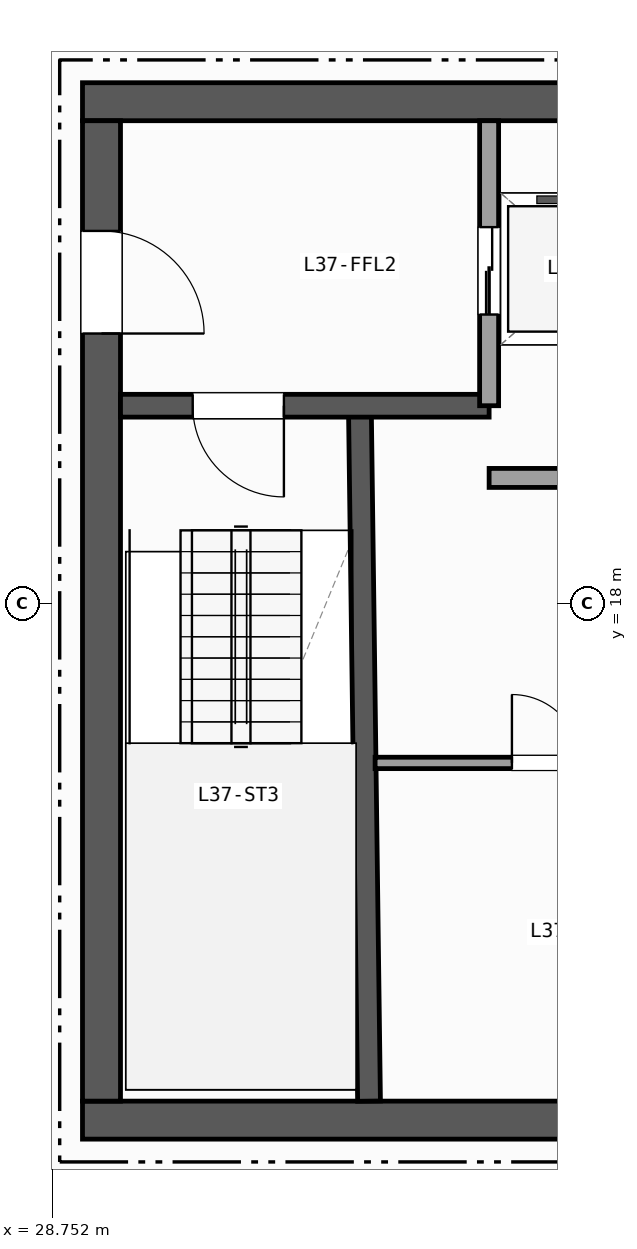
"""IFC4 building model, lengths in metres.
Left out: names, types, materials, properties, quantities, classifications, styles, units other than length and angle.
Written with IfcOpenShell. Run it as: python <this file> out.ifc"""

import sys

from ifc_helpers import new_model, si_unit, direction, frame, frame_2d, origin, place, context, subcontext, project, spatial, rectangle, extrude, element, fill, save


model = new_model("IFC4")
c1 = context("Model", 3, precision=1e-05, world=origin(), true_north=direction((0.0, 1.0)))
c2 = subcontext(c1, "Body", "Model", "MODEL_VIEW")
j1 = project(units=[si_unit("LENGTHUNIT", "METRE"), si_unit("PLANEANGLEUNIT", "RADIAN")], contexts=[c1])
p1 = place(None, origin())
s1 = spatial("IfcSite", under=j1, at=p1, CompositionType="ELEMENT")
p2 = place(p1, origin())
s2 = spatial("IfcBuilding", under=s1, at=p2, CompositionType="ELEMENT")
p3 = place(p2, frame((0.0, 0.0, 150.7)))
s3 = spatial("IfcBuildingStorey", under=s2, at=p3, CompositionType="ELEMENT", Elevation=150.7)
p4 = place(p3, frame((29.15, 11.2, 0.0), z_axis=(0.0, 0.0, 1.0), x_axis=(1.0, 0.0, 0.0)))
e1 = element("IfcWall", 1, at=p4, inside=s3, PredefinedType="SHEAR", context=c2, shape_type="SweptSolid", body=[
    extrude(rectangle(XDim=13.9, YDim=0.5, at=frame_2d((6.95, 0.0))), origin(), (0.0, 0.0, 1.0), 3.42),
])
p5 = place(p3, frame((43.05, 24.6, 0.0), z_axis=(0.0, 0.0, 1.0), x_axis=(-1.0, 0.0, 0.0)))
e2 = element("IfcWall", 2, at=p5, inside=s3, PredefinedType="SHEAR", context=c2, shape_type="SweptSolid", body=[
    extrude(rectangle(XDim=13.9, YDim=0.5, at=frame_2d((6.95, 0.0))), origin(), (0.0, 0.0, 1.0), 3.42),
])
p6 = place(p5, frame((0.75, 0.0, 0.0)))
e3 = element("IfcOpeningElement", 3, at=p6, cuts=e2, PredefinedType="OPENING", context=c2, shape_type="SweptSolid", body=[
    extrude(rectangle(XDim=1.1, YDim=2.15, at=frame_2d((0.55, 1.075))), frame((0.0, 0.26, 0.0), z_axis=(0.0, -1.0, 0.0), x_axis=(1.0, 0.0, 0.0)), (0.0, 0.0, 1.0), 0.52),
])
p7 = place(p5, frame((2.25, 0.0, 0.0)))
e4 = element("IfcOpeningElement", 4, at=p7, cuts=e2, PredefinedType="OPENING", context=c2, shape_type="SweptSolid", body=[
    extrude(rectangle(XDim=0.9, YDim=2.1, at=frame_2d((0.45, 1.05))), frame((0.0, 0.26, 0.0), z_axis=(0.0, -1.0, 0.0), x_axis=(1.0, 0.0, 0.0)), (0.0, 0.0, 1.0), 0.52),
])
p8 = place(p5, frame((3.55, 0.0, 0.0)))
e5 = element("IfcOpeningElement", 5, at=p8, cuts=e2, PredefinedType="OPENING", context=c2, shape_type="SweptSolid", body=[
    extrude(rectangle(XDim=0.9, YDim=2.1, at=frame_2d((0.45, 1.05))), frame((0.0, 0.26, 0.0), z_axis=(0.0, -1.0, 0.0), x_axis=(1.0, 0.0, 0.0)), (0.0, 0.0, 1.0), 0.52),
])
p9 = place(p5, frame((4.9, 0.0, 0.0)))
e6 = element("IfcOpeningElement", 6, at=p9, cuts=e2, PredefinedType="OPENING", context=c2, shape_type="SweptSolid", body=[
    extrude(rectangle(XDim=0.9, YDim=2.1, at=frame_2d((0.45, 1.05))), frame((0.0, 0.26, 0.0), z_axis=(0.0, -1.0, 0.0), x_axis=(1.0, 0.0, 0.0)), (0.0, 0.0, 1.0), 0.52),
])
p10 = place(p3, frame((29.4, 24.35, 0.0), z_axis=(0.0, 0.0, 1.0), x_axis=(0.0, -1.0, 0.0)))
e7 = element("IfcWall", 7, at=p10, inside=s3, PredefinedType="SHEAR", context=c2, shape_type="SweptSolid", body=[
    extrude(rectangle(XDim=12.9, YDim=0.5, at=frame_2d((6.45, 0.0))), origin(), (0.0, 0.0, 1.0), 3.42),
])
p11 = place(p10, frame((1.45, 0.0, 0.0)))
e8 = element("IfcOpeningElement", 8, at=p11, cuts=e7, PredefinedType="OPENING", context=c2, shape_type="SweptSolid", body=[
    extrude(rectangle(XDim=1.35, YDim=2.15, at=frame_2d((0.675, 1.075))), frame((0.0, 0.26, 0.0), z_axis=(0.0, -1.0, 0.0), x_axis=(1.0, 0.0, 0.0)), (0.0, 0.0, 1.0), 0.52),
])
p12 = place(p3, frame((32.92, 11.45, 0.0), z_axis=(0.0, 0.0, 1.0), x_axis=(-0.013171578211, 0.999913251001, 0.0)))
e9 = element("IfcWall", 9, at=p12, inside=s3, PredefinedType="SHEAR", context=c2, shape_type="SweptSolid", body=[
    extrude(rectangle(XDim=9.101, YDim=0.3, at=frame_2d((4.55, 0.0))), origin(), (0.0, 0.0, 1.0), 3.42),
])
p13 = place(p3, frame((34.5, 20.6, 0.0), z_axis=(0.0, 0.0, 1.0), x_axis=(-1.0, 0.0, 0.0)))
e10 = element("IfcWall", 10, at=p13, inside=s3, PredefinedType="SHEAR", context=c2, shape_type="SweptSolid", body=[
    extrude(rectangle(XDim=4.85, YDim=0.3, at=frame_2d((2.425, 0.0))), origin(), (0.0, 0.0, 1.0), 3.42),
])
p14 = place(p13, frame((2.7, 0.0, 0.0)))
e11 = element("IfcOpeningElement", 11, at=p14, cuts=e10, PredefinedType="OPENING", context=c2, shape_type="SweptSolid", body=[
    extrude(rectangle(XDim=1.2, YDim=2.15, at=frame_2d((0.6, 1.075))), frame((0.0, 0.16, 0.0), z_axis=(0.0, -1.0, 0.0), x_axis=(1.0, 0.0, 0.0)), (0.0, 0.0, 1.0), 0.32),
])
p15 = place(p3, frame((34.5, 20.6, 0.0), z_axis=(0.0, 0.0, 1.0), x_axis=(0.0, 1.0, 0.0)))
e12 = element("IfcWall", 12, at=p15, inside=s3, PredefinedType="PARTITIONING", context=c2, shape_type="SweptSolid", body=[
    extrude(rectangle(XDim=3.75, YDim=0.25, at=frame_2d((1.875, 0.0))), origin(), (0.0, 0.0, 1.0), 3.42),
])
p16 = place(p15, frame((1.2, 0.0, 0.0)))
e13 = element("IfcOpeningElement", 13, at=p16, cuts=e12, PredefinedType="OPENING", context=c2, shape_type="SweptSolid", body=[
    extrude(rectangle(XDim=1.15, YDim=2.15, at=frame_2d((0.575, 1.075))), frame((0.0, 0.135, 0.0), z_axis=(0.0, -1.0, 0.0), x_axis=(1.0, 0.0, 0.0)), (0.0, 0.0, 1.0), 0.27),
])
p17 = place(p3, frame((34.5, 19.65, 0.0), z_axis=(0.0, 0.0, 1.0), x_axis=(1.0, 0.0, 0.0)))
e14 = element("IfcWall", 14, at=p17, inside=s3, PredefinedType="PARTITIONING", context=c2, shape_type="SweptSolid", body=[
    extrude(rectangle(XDim=6.48, YDim=0.25, at=frame_2d((3.24, 0.0))), origin(), (0.0, 0.0, 1.0), 3.42),
])
p18 = place(p3, frame((33.0, 15.9, 0.0), z_axis=(0.0, 0.0, 1.0), x_axis=(1.0, 0.0, 0.0)))
e15 = element("IfcWall", 15, at=p18, inside=s3, PredefinedType="PARTITIONING", context=c2, shape_type="SweptSolid", body=[
    extrude(rectangle(XDim=5.1, YDim=0.15, at=frame_2d((2.55, 0.0))), origin(), (0.0, 0.0, 1.0), 3.42),
])
p19 = place(p18, frame((1.8, 0.0, 0.0)))
e16 = element("IfcOpeningElement", 16, at=p19, cuts=e15, PredefinedType="OPENING", context=c2, shape_type="SweptSolid", body=[
    extrude(rectangle(XDim=0.9, YDim=2.1, at=frame_2d((0.45, 1.05))), frame((0.0, 0.085, 0.0), z_axis=(0.0, -1.0, 0.0), x_axis=(1.0, 0.0, 0.0)), (0.0, 0.0, 1.0), 0.17),
])
p20 = place(p14, origin())
e17 = element("IfcDoor", 17, at=p20, inside=s3, OperationType="SINGLE_SWING_LEFT", PredefinedType="DOOR", context=c2, shape_type="SweptSolid", body=[
    extrude(rectangle(XDim=1.2, YDim=2.15, at=frame_2d((0.6, 1.075))), frame((0.0, 0.025, 0.0), z_axis=(0.0, -1.0, 0.0), x_axis=(1.0, 0.0, 0.0)), (0.0, 0.0, 1.0), 0.05),
])
fill(e11, e17)
p21 = place(p11, origin())
e18 = element("IfcDoor", 18, at=p21, inside=s3, OperationType="SINGLE_SWING_RIGHT", PredefinedType="DOOR", context=c2, shape_type="SweptSolid", body=[
    extrude(rectangle(XDim=1.35, YDim=2.15, at=frame_2d((0.675, 1.075))), frame((0.0, 0.025, 0.0), z_axis=(0.0, -1.0, 0.0), x_axis=(1.0, 0.0, 0.0)), (0.0, 0.0, 1.0), 0.05),
])
fill(e8, e18)
p22 = place(p16, origin())
e19 = element("IfcDoor", 19, at=p22, inside=s3, OperationType="DOUBLE_DOOR_SLIDING", PredefinedType="DOOR", context=c2, shape_type="SweptSolid", body=[
    extrude(rectangle(XDim=1.15, YDim=2.15, at=frame_2d((0.575, 1.075))), frame((0.0, 0.025, 0.0), z_axis=(0.0, -1.0, 0.0), x_axis=(1.0, 0.0, 0.0)), (0.0, 0.0, 1.0), 0.05),
])
fill(e13, e19)
p23 = place(p19, origin())
e20 = element("IfcDoor", 20, at=p23, inside=s3, OperationType="SINGLE_SWING_LEFT", PredefinedType="DOOR", context=c2, shape_type="SweptSolid", body=[
    extrude(rectangle(XDim=0.9, YDim=2.1, at=frame_2d((0.45, 1.05))), frame((0.0, 0.025, 0.0), z_axis=(0.0, -1.0, 0.0), x_axis=(1.0, 0.0, 0.0)), (0.0, 0.0, 1.0), 0.05),
])
fill(e16, e20)
save(model, sys.argv[1])
